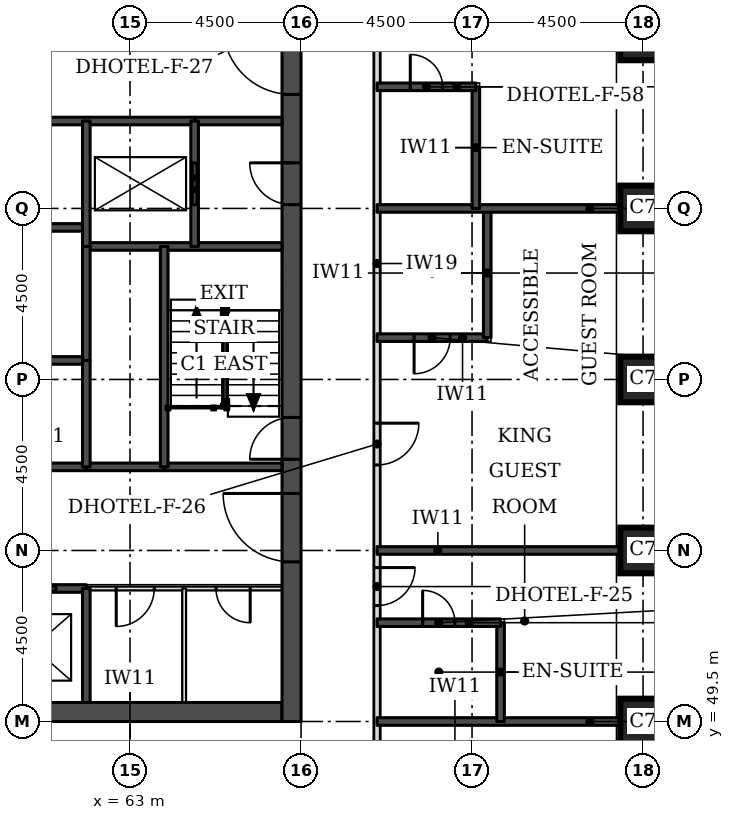
"""IFC4 building model, lengths in metres.
Left out: names, types, materials, properties, quantities, classifications, styles, units other than length and angle.
Written with IfcOpenShell. Run it as: python <this file> out.ifc"""

import sys

from ifc_helpers import new_model, si_unit, direction, frame, frame_2d, origin, origin_2d, place, context, subcontext, project, spatial, rectangle, extrude, element, fill, save


model = new_model("IFC4")
c1 = context("Model", 3, precision=1e-05, world=origin(), true_north=direction((0.0, 1.0)))
c2 = subcontext(c1, "Body", "Model", "MODEL_VIEW")
j1 = project(units=[si_unit("LENGTHUNIT", "METRE"), si_unit("PLANEANGLEUNIT", "RADIAN")], contexts=[c1])
p1 = place(None, origin())
s1 = spatial("IfcSite", under=j1, at=p1, CompositionType="ELEMENT")
p2 = place(p1, origin())
s2 = spatial("IfcBuilding", under=s1, at=p2, CompositionType="ELEMENT")
p3 = place(p2, frame((0.0, 0.0, 42.9)))
s3 = spatial("IfcBuildingStorey", under=s2, at=p3, CompositionType="ELEMENT", Elevation=42.9)
for number, where, z_axis, x_axis in (
    (1, (76.5, 49.5, 0.0), (0.0, 0.0, 1.0), (1.0, 0.0, 0.0)),
    (2, (76.5, 54.0, 0.0), (0.0, 0.0, 1.0), (1.0, 0.0, 0.0)),
    (3, (76.5, 58.5, 0.0), (0.0, 0.0, 1.0), (1.0, 0.0, 0.0)),
    (4, (76.5, 63.0, 0.0), (0.0, 0.0, 1.0), (1.0, 0.0, 0.0)),
    (5, (76.5, 67.5, 0.0), (0.0, 0.0, 1.0), (1.0, 0.0, 0.0)),
):
    element("IfcColumn", number, at=place(p3, frame(where, z_axis=z_axis, x_axis=x_axis)), inside=s3, PredefinedType="COLUMN", context=c2, shape_type="SweptSolid", body=[
        extrude(rectangle(XDim=1.2, YDim=1.2, at=origin_2d()), origin(), (0.0, 0.0, 1.0), 3.3),
    ])
p4 = place(p3, frame((45.5, 49.75, 0.0), z_axis=(0.0, 0.0, 1.0), x_axis=(1.0, 0.0, 0.0)))
e6 = element("IfcWall", 6, at=p4, inside=s3, PredefinedType="SHEAR", context=c2, shape_type="SweptSolid", body=[
    extrude(rectangle(XDim=21.5, YDim=0.5, at=frame_2d((10.75, 0.0))), origin(), (0.0, 0.0, 1.0), 3.3),
])
p5 = place(p3, frame((67.25, 49.5, 0.0), z_axis=(0.0, 0.0, 1.0), x_axis=(0.0, 1.0, 0.0)))
e7 = element("IfcWall", 7, at=p5, inside=s3, PredefinedType="SHEAR", context=c2, shape_type="SweptSolid", body=[
    extrude(rectangle(XDim=22.5, YDim=0.5, at=frame_2d((11.25, 0.0))), origin(), (0.0, 0.0, 1.0), 3.3),
])
p6 = place(p5, frame((4.2, 0.0, 0.0)))
e8 = element("IfcOpeningElement", 8, at=p6, cuts=e7, PredefinedType="OPENING", context=c2, shape_type="SweptSolid", body=[
    extrude(rectangle(XDim=1.8, YDim=2.1, at=frame_2d((0.9, 1.05))), frame((0.0, 0.26, 0.0), z_axis=(0.0, -1.0, 0.0), x_axis=(1.0, 0.0, 0.0)), (0.0, 0.0, 1.0), 0.52),
])
p7 = place(p5, frame((6.9, 0.0, 0.0)))
e9 = element("IfcOpeningElement", 9, at=p7, cuts=e7, PredefinedType="OPENING", context=c2, shape_type="SweptSolid", body=[
    extrude(rectangle(XDim=1.1, YDim=2.1, at=frame_2d((0.55, 1.05))), frame((0.0, 0.26, 0.0), z_axis=(0.0, -1.0, 0.0), x_axis=(1.0, 0.0, 0.0)), (0.0, 0.0, 1.0), 0.52),
])
p8 = place(p5, frame((13.6, 0.0, 0.0)))
e10 = element("IfcOpeningElement", 10, at=p8, cuts=e7, PredefinedType="OPENING", context=c2, shape_type="SweptSolid", body=[
    extrude(rectangle(XDim=1.1, YDim=2.1, at=frame_2d((0.55, 1.05))), frame((0.0, 0.26, 0.0), z_axis=(0.0, -1.0, 0.0), x_axis=(1.0, 0.0, 0.0)), (0.0, 0.0, 1.0), 0.52),
])
p9 = place(p5, frame((16.5, 0.0, 0.0)))
e11 = element("IfcOpeningElement", 11, at=p9, cuts=e7, PredefinedType="OPENING", context=c2, shape_type="SweptSolid", body=[
    extrude(rectangle(XDim=1.8, YDim=2.1, at=frame_2d((0.9, 1.05))), frame((0.0, 0.26, 0.0), z_axis=(0.0, -1.0, 0.0), x_axis=(1.0, 0.0, 0.0)), (0.0, 0.0, 1.0), 0.52),
])
p10 = place(p3, frame((69.5, 47.5, 0.0), z_axis=(0.0, 0.0, 1.0), x_axis=(0.0, 1.0, 0.0)))
e12 = element("IfcWall", 12, at=p10, inside=s3, PredefinedType="PARTITIONING", context=c2, shape_type="SweptSolid", body=[
    extrude(rectangle(XDim=26.5, YDim=0.15, at=frame_2d((13.25, 0.0))), origin(), (0.0, 0.0, 1.0), 3.08),
])
p11 = place(p10, frame((25.053, 0.0, 0.0)))
e13 = element("IfcOpeningElement", 13, at=p11, cuts=e12, PredefinedType="OPENING", context=c2, shape_type="SweptSolid", body=[
    extrude(rectangle(XDim=1.0, YDim=2.1, at=frame_2d((0.5, 1.05))), frame((0.0, 0.085, 0.0), z_axis=(0.0, -1.0, 0.0), x_axis=(1.0, 0.0, 0.0)), (0.0, 0.0, 1.0), 0.17),
])
p12 = place(p10, frame((21.1, 0.0, 0.0)))
e14 = element("IfcOpeningElement", 14, at=p12, cuts=e12, PredefinedType="OPENING", context=c2, shape_type="SweptSolid", body=[
    extrude(rectangle(XDim=1.0, YDim=2.1, at=frame_2d((0.5, 1.05))), frame((0.0, 0.085, 0.0), z_axis=(0.0, -1.0, 0.0), x_axis=(1.0, 0.0, 0.0)), (0.0, 0.0, 1.0), 0.17),
])
p13 = place(p10, frame((8.75, 0.0, 0.0)))
e15 = element("IfcOpeningElement", 15, at=p13, cuts=e12, PredefinedType="OPENING", context=c2, shape_type="SweptSolid", body=[
    extrude(rectangle(XDim=1.1, YDim=2.1, at=frame_2d((0.55, 1.05))), frame((0.0, 0.085, 0.0), z_axis=(0.0, -1.0, 0.0), x_axis=(1.0, 0.0, 0.0)), (0.0, 0.0, 1.0), 0.17),
])
p14 = place(p10, frame((5.05, 0.0, 0.0)))
e16 = element("IfcOpeningElement", 16, at=p14, cuts=e12, PredefinedType="OPENING", context=c2, shape_type="SweptSolid", body=[
    extrude(rectangle(XDim=1.0, YDim=2.1, at=frame_2d((0.5, 1.05))), frame((0.0, 0.085, 0.0), z_axis=(0.0, -1.0, 0.0), x_axis=(1.0, 0.0, 0.0)), (0.0, 0.0, 1.0), 0.17),
])
p15 = place(p10, frame((0.447, 0.0, 0.0)))
e17 = element("IfcOpeningElement", 17, at=p15, cuts=e12, PredefinedType="OPENING", context=c2, shape_type="SweptSolid", body=[
    extrude(rectangle(XDim=1.0, YDim=2.1, at=frame_2d((0.5, 1.05))), frame((0.0, 0.085, 0.0), z_axis=(0.0, -1.0, 0.0), x_axis=(1.0, 0.0, 0.0)), (0.0, 0.0, 1.0), 0.17),
])
p16 = place(p3, frame((69.5, 49.5, 0.0), z_axis=(0.0, 0.0, 1.0), x_axis=(1.0, 0.0, 0.0)))
e18 = element("IfcWall", 18, at=p16, inside=s3, PredefinedType="SOLIDWALL", context=c2, shape_type="SweptSolid", body=[
    extrude(rectangle(XDim=6.4, YDim=0.2, at=frame_2d((3.2, 0.0))), origin(), (0.0, 0.0, 1.0), 3.08),
])
p17 = place(p3, frame((72.75, 49.5, 0.0), z_axis=(0.0, 0.0, 1.0), x_axis=(0.0, 1.0, 0.0)))
e19 = element("IfcWall", 19, at=p17, inside=s3, PredefinedType="SOLIDWALL", context=c2, shape_type="SweptSolid", body=[
    extrude(rectangle(XDim=2.6, YDim=0.2, at=frame_2d((1.3, 0.0))), origin(), (0.0, 0.0, 1.0), 3.08),
])
p18 = place(p3, frame((69.5, 52.1, 0.0), z_axis=(0.0, 0.0, 1.0), x_axis=(1.0, 0.0, 0.0)))
e20 = element("IfcWall", 20, at=p18, inside=s3, PredefinedType="SOLIDWALL", context=c2, shape_type="SweptSolid", body=[
    extrude(rectangle(XDim=3.25, YDim=0.2, at=frame_2d((1.625, 0.0))), origin(), (0.0, 0.0, 1.0), 3.08),
])
p19 = place(p18, frame((1.2, 0.0, 0.0)))
e21 = element("IfcOpeningElement", 21, at=p19, cuts=e20, PredefinedType="OPENING", context=c2, shape_type="SweptSolid", body=[
    extrude(rectangle(XDim=0.85, YDim=2.1, at=frame_2d((0.425, 1.05))), frame((0.0, 0.11, 0.0), z_axis=(0.0, -1.0, 0.0), x_axis=(1.0, 0.0, 0.0)), (0.0, 0.0, 1.0), 0.22),
])
p20 = place(p3, frame((69.5, 54.0, 0.0), z_axis=(0.0, 0.0, 1.0), x_axis=(1.0, 0.0, 0.0)))
e22 = element("IfcWall", 22, at=p20, inside=s3, PredefinedType="SOLIDWALL", context=c2, shape_type="SweptSolid", body=[
    extrude(rectangle(XDim=6.4, YDim=0.2, at=frame_2d((3.2, 0.0))), origin(), (0.0, 0.0, 1.0), 3.08),
])
p21 = place(p3, frame((69.5, 59.6, 0.0), z_axis=(0.0, 0.0, 1.0), x_axis=(1.0, 0.0, 0.0)))
e23 = element("IfcWall", 23, at=p21, inside=s3, PredefinedType="SOLIDWALL", context=c2, shape_type="SweptSolid", body=[
    extrude(rectangle(XDim=2.9, YDim=0.2, at=frame_2d((1.45, 0.0))), origin(), (0.0, 0.0, 1.0), 3.08),
])
p22 = place(p21, frame((0.975, 0.0, 0.0)))
e24 = element("IfcOpeningElement", 24, at=p22, cuts=e23, PredefinedType="OPENING", context=c2, shape_type="SweptSolid", body=[
    extrude(rectangle(XDim=0.95, YDim=2.1, at=frame_2d((0.475, 1.05))), frame((0.0, 0.11, 0.0), z_axis=(0.0, -1.0, 0.0), x_axis=(1.0, 0.0, 0.0)), (0.0, 0.0, 1.0), 0.22),
])
p23 = place(p3, frame((72.4, 59.6, 0.0), z_axis=(0.0, 0.0, 1.0), x_axis=(0.0, 1.0, 0.0)))
e25 = element("IfcWall", 25, at=p23, inside=s3, PredefinedType="SOLIDWALL", context=c2, shape_type="SweptSolid", body=[
    extrude(rectangle(XDim=3.4, YDim=0.2, at=frame_2d((1.7, 0.0))), origin(), (0.0, 0.0, 1.0), 3.08),
])
p24 = place(p3, frame((69.5, 63.0, 0.0), z_axis=(0.0, 0.0, 1.0), x_axis=(1.0, 0.0, 0.0)))
e26 = element("IfcWall", 26, at=p24, inside=s3, PredefinedType="SOLIDWALL", context=c2, shape_type="SweptSolid", body=[
    extrude(rectangle(XDim=6.4, YDim=0.2, at=frame_2d((3.2, 0.0))), origin(), (0.0, 0.0, 1.0), 3.08),
])
p25 = place(p3, frame((72.1, 63.0, 0.0), z_axis=(0.0, 0.0, 1.0), x_axis=(0.0, 1.0, 0.0)))
e27 = element("IfcWall", 27, at=p25, inside=s3, PredefinedType="SOLIDWALL", context=c2, shape_type="SweptSolid", body=[
    extrude(rectangle(XDim=3.2, YDim=0.2, at=frame_2d((1.6, 0.0))), origin(), (0.0, 0.0, 1.0), 3.08),
])
p26 = place(p3, frame((69.5, 66.2, 0.0), z_axis=(0.0, 0.0, 1.0), x_axis=(1.0, 0.0, 0.0)))
e28 = element("IfcWall", 28, at=p26, inside=s3, PredefinedType="SOLIDWALL", context=c2, shape_type="SweptSolid", body=[
    extrude(rectangle(XDim=2.6, YDim=0.2, at=frame_2d((1.3, 0.0))), origin(), (0.0, 0.0, 1.0), 3.08),
])
p27 = place(p26, frame((0.875, 0.0, 0.0)))
e29 = element("IfcOpeningElement", 29, at=p27, cuts=e28, PredefinedType="OPENING", context=c2, shape_type="SweptSolid", body=[
    extrude(rectangle(XDim=0.85, YDim=2.1, at=frame_2d((0.425, 1.05))), frame((0.0, 0.11, 0.0), z_axis=(0.0, -1.0, 0.0), x_axis=(1.0, 0.0, 0.0)), (0.0, 0.0, 1.0), 0.22),
])
p28 = place(p3, frame((61.85, 53.0, 0.0), z_axis=(0.0, 0.0, 1.0), x_axis=(1.0, 0.0, 0.0)))
e30 = element("IfcWall", 30, at=p28, inside=s3, PredefinedType="PARTITIONING", context=c2, shape_type="SweptSolid", body=[
    extrude(rectangle(XDim=5.15, YDim=0.1, at=frame_2d((2.575, 0.0))), origin(), (0.0, 0.0, 1.0), 3.08),
])
p29 = place(p28, frame((3.413, 0.0, 0.0)))
e31 = element("IfcOpeningElement", 31, at=p29, cuts=e30, PredefinedType="OPENING", context=c2, shape_type="SweptSolid", body=[
    extrude(rectangle(XDim=0.9, YDim=2.1, at=frame_2d((0.45, 1.05))), frame((0.0, 0.06, 0.0), z_axis=(0.0, -1.0, 0.0), x_axis=(1.0, 0.0, 0.0)), (0.0, 0.0, 1.0), 0.12),
])
p30 = place(p28, frame((0.788, 0.0, 0.0)))
e32 = element("IfcOpeningElement", 32, at=p30, cuts=e30, PredefinedType="OPENING", context=c2, shape_type="SweptSolid", body=[
    extrude(rectangle(XDim=1.0, YDim=2.1, at=frame_2d((0.5, 1.05))), frame((0.0, 0.06, 0.0), z_axis=(0.0, -1.0, 0.0), x_axis=(1.0, 0.0, 0.0)), (0.0, 0.0, 1.0), 0.12),
])
p31 = place(p3, frame((50.65, 53.0, 0.0), z_axis=(0.0, 0.0, 1.0), x_axis=(1.0, 0.0, 0.0)))
e33 = element("IfcWall", 33, at=p31, inside=s3, PredefinedType="SOLIDWALL", context=c2, shape_type="SweptSolid", body=[
    extrude(rectangle(XDim=11.2, YDim=0.2, at=frame_2d((5.6, 0.0))), origin(), (0.0, 0.0, 1.0), 3.08),
])
p32 = place(p31, frame((0.8, 0.0, 0.0)))
e34 = element("IfcOpeningElement", 34, at=p32, cuts=e33, PredefinedType="OPENING", context=c2, shape_type="SweptSolid", body=[
    extrude(rectangle(XDim=1.2, YDim=2.1, at=frame_2d((0.6, 1.05))), frame((0.0, 0.11, 0.0), z_axis=(0.0, -1.0, 0.0), x_axis=(1.0, 0.0, 0.0)), (0.0, 0.0, 1.0), 0.22),
])
p33 = place(p31, frame((3.6, 0.0, 0.0)))
e35 = element("IfcOpeningElement", 35, at=p33, cuts=e33, PredefinedType="OPENING", context=c2, shape_type="SweptSolid", body=[
    extrude(rectangle(XDim=1.2, YDim=2.1, at=frame_2d((0.6, 1.05))), frame((0.0, 0.11, 0.0), z_axis=(0.0, -1.0, 0.0), x_axis=(1.0, 0.0, 0.0)), (0.0, 0.0, 1.0), 0.22),
])
p34 = place(p31, frame((6.4, 0.0, 0.0)))
e36 = element("IfcOpeningElement", 36, at=p34, cuts=e33, PredefinedType="OPENING", context=c2, shape_type="SweptSolid", body=[
    extrude(rectangle(XDim=1.2, YDim=2.1, at=frame_2d((0.6, 1.05))), frame((0.0, 0.11, 0.0), z_axis=(0.0, -1.0, 0.0), x_axis=(1.0, 0.0, 0.0)), (0.0, 0.0, 1.0), 0.22),
])
p35 = place(p31, frame((9.2, 0.0, 0.0)))
e37 = element("IfcOpeningElement", 37, at=p35, cuts=e33, PredefinedType="OPENING", context=c2, shape_type="SweptSolid", body=[
    extrude(rectangle(XDim=1.2, YDim=2.1, at=frame_2d((0.6, 1.05))), frame((0.0, 0.11, 0.0), z_axis=(0.0, -1.0, 0.0), x_axis=(1.0, 0.0, 0.0)), (0.0, 0.0, 1.0), 0.22),
])
p36 = place(p3, frame((61.85, 56.2, 0.0), z_axis=(0.0, 0.0, 1.0), x_axis=(1.0, 0.0, 0.0)))
e38 = element("IfcWall", 38, at=p36, inside=s3, PredefinedType="SOLIDWALL", context=c2, shape_type="SweptSolid", body=[
    extrude(rectangle(XDim=2.05, YDim=0.2, at=frame_2d((1.025, 0.0))), origin(), (0.0, 0.0, 1.0), 3.08),
])
p37 = place(p3, frame((50.65, 56.2, 0.0), z_axis=(0.0, 0.0, 1.0), x_axis=(1.0, 0.0, 0.0)))
e39 = element("IfcWall", 39, at=p37, inside=s3, PredefinedType="SOLIDWALL", context=c2, shape_type="SweptSolid", body=[
    extrude(rectangle(XDim=11.2, YDim=0.2, at=frame_2d((5.6, 0.0))), origin(), (0.0, 0.0, 1.0), 3.08),
])
p38 = place(p3, frame((63.9, 56.2, 0.0), z_axis=(0.0, 0.0, 1.0), x_axis=(1.0, 0.0, 0.0)))
e40 = element("IfcWall", 40, at=p38, inside=s3, PredefinedType="SOLIDWALL", context=c2, shape_type="SweptSolid", body=[
    extrude(rectangle(XDim=3.1, YDim=0.2, at=frame_2d((1.55, 0.0))), origin(), (0.0, 0.0, 1.0), 3.08),
])
p39 = place(p3, frame((50.65, 59.0, 0.0), z_axis=(0.0, 0.0, 1.0), x_axis=(1.0, 0.0, 0.0)))
e41 = element("IfcWall", 41, at=p39, inside=s3, PredefinedType="SOLIDWALL", context=c2, shape_type="SweptSolid", body=[
    extrude(rectangle(XDim=11.2, YDim=0.2, at=frame_2d((5.6, 0.0))), origin(), (0.0, 0.0, 1.0), 3.3),
])
p40 = place(p3, frame((61.85, 62.0, 0.0), z_axis=(0.0, 0.0, 1.0), x_axis=(1.0, 0.0, 0.0)))
e42 = element("IfcWall", 42, at=p40, inside=s3, PredefinedType="SOLIDWALL", context=c2, shape_type="SweptSolid", body=[
    extrude(rectangle(XDim=5.15, YDim=0.2, at=frame_2d((2.575, 0.0))), origin(), (0.0, 0.0, 1.0), 3.08),
])
p41 = place(p3, frame((50.65, 62.5, 0.0), z_axis=(0.0, 0.0, 1.0), x_axis=(1.0, 0.0, 0.0)))
e43 = element("IfcWall", 43, at=p41, inside=s3, PredefinedType="SOLIDWALL", context=c2, shape_type="SweptSolid", body=[
    extrude(rectangle(XDim=11.2, YDim=0.2, at=frame_2d((5.6, 0.0))), origin(), (0.0, 0.0, 1.0), 3.3),
])
p42 = place(p3, frame((64.7, 65.3, 0.0), z_axis=(0.0, 0.0, 1.0), x_axis=(1.0, 0.0, 0.0)))
e44 = element("IfcWall", 44, at=p42, inside=s3, PredefinedType="SOLIDWALL", context=c2, shape_type="SweptSolid", body=[
    extrude(rectangle(XDim=2.3, YDim=0.2, at=frame_2d((1.15, 0.0))), origin(), (0.0, 0.0, 1.0), 3.08),
])
p43 = place(p3, frame((47.8, 65.3, 0.0), z_axis=(0.0, 0.0, 1.0), x_axis=(1.0, 0.0, 0.0)))
e45 = element("IfcWall", 45, at=p43, inside=s3, PredefinedType="SOLIDWALL", context=c2, shape_type="SweptSolid", body=[
    extrude(rectangle(XDim=16.9, YDim=0.2, at=frame_2d((8.45, 0.0))), origin(), (0.0, 0.0, 1.0), 3.08),
])
p44 = place(p3, frame((61.85, 59.0, 0.0), z_axis=(0.0, 0.0, 1.0), x_axis=(0.0, 1.0, 0.0)))
e46 = element("IfcWall", 46, at=p44, inside=s3, PredefinedType="SOLIDWALL", context=c2, shape_type="SweptSolid", body=[
    extrude(rectangle(XDim=3.0, YDim=0.2, at=frame_2d((1.5, 0.0))), origin(), (0.0, 0.0, 1.0), 3.3),
])
p45 = place(p3, frame((61.85, 50.0, 0.0), z_axis=(0.0, 0.0, 1.0), x_axis=(0.0, 1.0, 0.0)))
e47 = element("IfcWall", 47, at=p45, inside=s3, PredefinedType="SOLIDWALL", context=c2, shape_type="SweptSolid", body=[
    extrude(rectangle(XDim=3.0, YDim=0.2, at=frame_2d((1.5, 0.0))), origin(), (0.0, 0.0, 1.0), 3.08),
])
p46 = place(p3, frame((61.85, 56.2, 0.0), z_axis=(0.0, 0.0, 1.0), x_axis=(0.0, 1.0, 0.0)))
e48 = element("IfcWall", 48, at=p46, inside=s3, PredefinedType="SOLIDWALL", context=c2, shape_type="SweptSolid", body=[
    extrude(rectangle(XDim=2.8, YDim=0.2, at=frame_2d((1.4, 0.0))), origin(), (0.0, 0.0, 1.0), 3.08),
])
p47 = place(p3, frame((61.85, 62.0, 0.0), z_axis=(0.0, 0.0, 1.0), x_axis=(0.0, 1.0, 0.0)))
e49 = element("IfcWall", 49, at=p47, inside=s3, PredefinedType="SOLIDWALL", context=c2, shape_type="SweptSolid", body=[
    extrude(rectangle(XDim=3.3, YDim=0.2, at=frame_2d((1.65, 0.0))), origin(), (0.0, 0.0, 1.0), 3.08),
])
p48 = place(p3, frame((63.9, 56.2, 0.0), z_axis=(0.0, 0.0, 1.0), x_axis=(0.0, 1.0, 0.0)))
e50 = element("IfcWall", 50, at=p48, inside=s3, PredefinedType="SOLIDWALL", context=c2, shape_type="SweptSolid", body=[
    extrude(rectangle(XDim=5.8, YDim=0.2, at=frame_2d((2.9, 0.0))), origin(), (0.0, 0.0, 1.0), 3.08),
])
p49 = place(p3, frame((64.425, 50.0, 0.0), z_axis=(0.0, 0.0, 1.0), x_axis=(0.0, 1.0, 0.0)))
e51 = element("IfcWall", 51, at=p49, inside=s3, PredefinedType="PARTITIONING", context=c2, shape_type="SweptSolid", body=[
    extrude(rectangle(XDim=3.0, YDim=0.1, at=frame_2d((1.5, 0.0))), origin(), (0.0, 0.0, 1.0), 3.08),
])
p50 = place(p3, frame((64.7, 62.0, 0.0), z_axis=(0.0, 0.0, 1.0), x_axis=(0.0, 1.0, 0.0)))
e52 = element("IfcWall", 52, at=p50, inside=s3, PredefinedType="SOLIDWALL", context=c2, shape_type="SweptSolid", body=[
    extrude(rectangle(XDim=3.3, YDim=0.2, at=frame_2d((1.65, 0.0))), origin(), (0.0, 0.0, 1.0), 3.08),
])
p51 = place(p50, frame((1.1, 0.0, 0.0)))
e53 = element("IfcOpeningElement", 53, at=p51, cuts=e52, PredefinedType="OPENING", context=c2, shape_type="SweptSolid", body=[
    extrude(rectangle(XDim=1.1, YDim=2.1, at=frame_2d((0.55, 1.05))), frame((0.0, 0.11, 0.0), z_axis=(0.0, -1.0, 0.0), x_axis=(1.0, 0.0, 0.0)), (0.0, 0.0, 1.0), 0.22),
])
p52 = place(p27, origin())
e54 = element("IfcDoor", 54, at=p52, inside=s3, OperationType="SINGLE_SWING_LEFT", PredefinedType="DOOR", context=c2, shape_type="SweptSolid", body=[
    extrude(rectangle(XDim=0.85, YDim=2.1, at=frame_2d((0.425, 1.05))), frame((0.0, 0.025, 0.0), z_axis=(0.0, -1.0, 0.0), x_axis=(1.0, 0.0, 0.0)), (0.0, 0.0, 1.0), 0.05),
])
fill(e29, e54)
p53 = place(p13, frame((1.1, 0.0, 0.0), z_axis=(0.0, 0.0, 1.0), x_axis=(-1.0, 0.0, 0.0)))
e55 = element("IfcDoor", 55, at=p53, inside=s3, OperationType="SINGLE_SWING_LEFT", PredefinedType="DOOR", context=c2, shape_type="SweptSolid", body=[
    extrude(rectangle(XDim=1.1, YDim=2.1, at=frame_2d((0.55, 1.05))), frame((0.0, 0.025, 0.0), z_axis=(0.0, -1.0, 0.0), x_axis=(1.0, 0.0, 0.0)), (0.0, 0.0, 1.0), 0.05),
])
fill(e15, e55)
p54 = place(p22, frame((0.95, 0.0, 0.0), z_axis=(0.0, 0.0, 1.0), x_axis=(-1.0, 0.0, 0.0)))
e56 = element("IfcDoor", 56, at=p54, inside=s3, OperationType="SINGLE_SWING_RIGHT", PredefinedType="DOOR", context=c2, shape_type="SweptSolid", body=[
    extrude(rectangle(XDim=0.95, YDim=2.1, at=frame_2d((0.475, 1.05))), frame((0.0, 0.025, 0.0), z_axis=(0.0, -1.0, 0.0), x_axis=(1.0, 0.0, 0.0)), (0.0, 0.0, 1.0), 0.05),
])
fill(e24, e56)
p55 = place(p14, frame((1.0, 0.0, 0.0), z_axis=(0.0, 0.0, 1.0), x_axis=(-1.0, 0.0, 0.0)))
e57 = element("IfcDoor", 57, at=p55, inside=s3, OperationType="SINGLE_SWING_LEFT", PredefinedType="DOOR", context=c2, shape_type="SweptSolid", body=[
    extrude(rectangle(XDim=1.0, YDim=2.1, at=frame_2d((0.5, 1.05))), frame((0.0, 0.025, 0.0), z_axis=(0.0, -1.0, 0.0), x_axis=(1.0, 0.0, 0.0)), (0.0, 0.0, 1.0), 0.05),
])
fill(e16, e57)
p56 = place(p19, origin())
e58 = element("IfcDoor", 58, at=p56, inside=s3, OperationType="SINGLE_SWING_LEFT", PredefinedType="DOOR", context=c2, shape_type="SweptSolid", body=[
    extrude(rectangle(XDim=0.85, YDim=2.1, at=frame_2d((0.425, 1.05))), frame((0.0, 0.025, 0.0), z_axis=(0.0, -1.0, 0.0), x_axis=(1.0, 0.0, 0.0)), (0.0, 0.0, 1.0), 0.05),
])
fill(e21, e58)
p57 = place(p35, origin())
e59 = element("IfcDoor", 59, at=p57, inside=s3, OperationType="DOUBLE_DOOR_SLIDING", PredefinedType="DOOR", context=c2, shape_type="SweptSolid", body=[
    extrude(rectangle(XDim=1.2, YDim=2.1, at=frame_2d((0.6, 1.05))), frame((0.0, 0.025, 0.0), z_axis=(0.0, -1.0, 0.0), x_axis=(1.0, 0.0, 0.0)), (0.0, 0.0, 1.0), 0.05),
])
fill(e37, e59)
p58 = place(p51, origin())
e60 = element("IfcDoor", 60, at=p58, inside=s3, OperationType="DOUBLE_DOOR_SLIDING", PredefinedType="DOOR", context=c2, shape_type="SweptSolid", body=[
    extrude(rectangle(XDim=1.1, YDim=2.1, at=frame_2d((0.55, 1.05))), frame((0.0, 0.025, 0.0), z_axis=(0.0, -1.0, 0.0), x_axis=(1.0, 0.0, 0.0)), (0.0, 0.0, 1.0), 0.05),
])
fill(e53, e60)
p59 = place(p6, origin())
e61 = element("IfcDoor", 61, at=p59, inside=s3, OperationType="SINGLE_SWING_RIGHT", PredefinedType="DOOR", context=c2, shape_type="SweptSolid", body=[
    extrude(rectangle(XDim=1.8, YDim=2.1, at=frame_2d((0.9, 1.05))), frame((0.0, 0.025, 0.0), z_axis=(0.0, -1.0, 0.0), x_axis=(1.0, 0.0, 0.0)), (0.0, 0.0, 1.0), 0.05),
])
fill(e8, e61)
p60 = place(p7, origin())
e62 = element("IfcDoor", 62, at=p60, inside=s3, OperationType="SINGLE_SWING_LEFT", PredefinedType="DOOR", context=c2, shape_type="SweptSolid", body=[
    extrude(rectangle(XDim=1.1, YDim=2.1, at=frame_2d((0.55, 1.05))), frame((0.0, 0.025, 0.0), z_axis=(0.0, -1.0, 0.0), x_axis=(1.0, 0.0, 0.0)), (0.0, 0.0, 1.0), 0.05),
])
fill(e9, e62)
p61 = place(p8, origin())
e63 = element("IfcDoor", 63, at=p61, inside=s3, OperationType="SINGLE_SWING_RIGHT", PredefinedType="DOOR", context=c2, shape_type="SweptSolid", body=[
    extrude(rectangle(XDim=1.1, YDim=2.1, at=frame_2d((0.55, 1.05))), frame((0.0, 0.025, 0.0), z_axis=(0.0, -1.0, 0.0), x_axis=(1.0, 0.0, 0.0)), (0.0, 0.0, 1.0), 0.05),
])
fill(e10, e63)
p62 = place(p9, origin())
e64 = element("IfcDoor", 64, at=p62, inside=s3, OperationType="SINGLE_SWING_RIGHT", PredefinedType="DOOR", context=c2, shape_type="SweptSolid", body=[
    extrude(rectangle(XDim=1.8, YDim=2.1, at=frame_2d((0.9, 1.05))), frame((0.0, 0.025, 0.0), z_axis=(0.0, -1.0, 0.0), x_axis=(1.0, 0.0, 0.0)), (0.0, 0.0, 1.0), 0.05),
])
fill(e11, e64)
p63 = place(p29, frame((0.9, 0.0, 0.0), z_axis=(0.0, 0.0, 1.0), x_axis=(-1.0, 0.0, 0.0)))
e65 = element("IfcDoor", 65, at=p63, inside=s3, OperationType="SINGLE_SWING_LEFT", PredefinedType="DOOR", context=c2, shape_type="SweptSolid", body=[
    extrude(rectangle(XDim=0.9, YDim=2.1, at=frame_2d((0.45, 1.05))), frame((0.0, 0.025, 0.0), z_axis=(0.0, -1.0, 0.0), x_axis=(1.0, 0.0, 0.0)), (0.0, 0.0, 1.0), 0.05),
])
fill(e31, e65)
p64 = place(p30, frame((1.0, 0.0, 0.0), z_axis=(0.0, 0.0, 1.0), x_axis=(-1.0, 0.0, 0.0)))
e66 = element("IfcDoor", 66, at=p64, inside=s3, OperationType="SINGLE_SWING_RIGHT", PredefinedType="DOOR", context=c2, shape_type="SweptSolid", body=[
    extrude(rectangle(XDim=1.0, YDim=2.1, at=frame_2d((0.5, 1.05))), frame((0.0, 0.025, 0.0), z_axis=(0.0, -1.0, 0.0), x_axis=(1.0, 0.0, 0.0)), (0.0, 0.0, 1.0), 0.05),
])
fill(e32, e66)
save(model, sys.argv[1])
